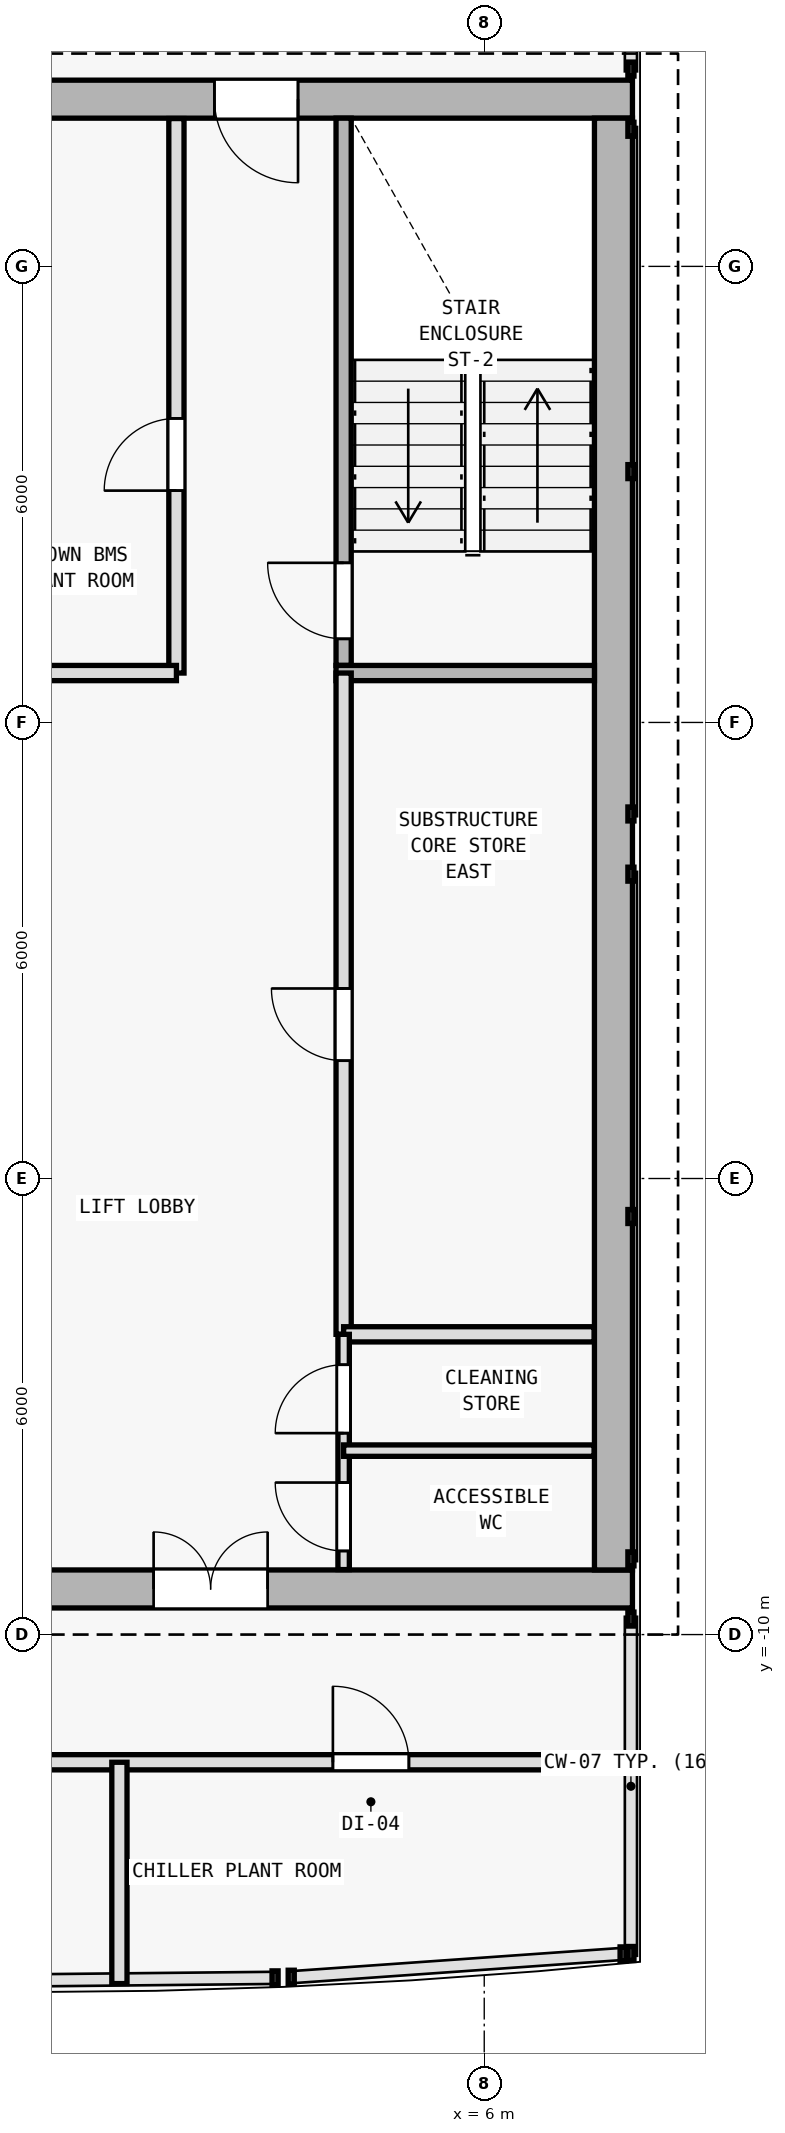
"""IFC4 building model, lengths in metres.
Left out: names, types, materials, properties, quantities, classifications, styles, units other than length and angle.
Written with IfcOpenShell. Run it as: python <this file> out.ifc"""

import sys

from ifc_helpers import new_model, si_unit, direction, frame, frame_2d, origin, origin_2d, place, context, subcontext, project, spatial, rectangle, i_section, extrude, element, fill, save


model = new_model("IFC4")
c1 = context("Model", 3, precision=1e-05, world=origin(), true_north=direction((0.0, 1.0)))
c2 = subcontext(c1, "Body", "Model", "MODEL_VIEW")
j1 = project(units=[si_unit("LENGTHUNIT", "METRE"), si_unit("PLANEANGLEUNIT", "RADIAN")], contexts=[c1])
p1 = place(None, origin())
s1 = spatial("IfcSite", under=j1, at=p1, CompositionType="ELEMENT")
p2 = place(p1, origin())
s2 = spatial("IfcBuilding", under=s1, at=p2, CompositionType="ELEMENT")
p3 = place(p2, frame((0.0, 0.0, 315.6)))
s3 = spatial("IfcBuildingStorey", under=s2, at=p3, CompositionType="ELEMENT", Elevation=315.6)
for number, where, z_axis, x_axis in (
    (1, (7.7, -9.4, 0.0), (0.0, 0.0, 1.0), (1.0, 0.0, 0.0)),
    (2, (7.7, 10.2, 0.0), (0.0, 0.0, 1.0), (1.0, 0.0, 0.0)),
    (3, (7.7, 0.4, 0.0), (0.0, 0.0, 1.0), (1.0, 0.0, 0.0)),
):
    element("IfcColumn", number, at=place(p3, frame(where, z_axis=z_axis, x_axis=x_axis)), inside=s3, PredefinedType="COLUMN", context=c2, shape_type="SweptSolid", body=[
        extrude(i_section(OverallWidth=0.374, OverallDepth=0.372, WebThickness=0.012, FlangeThickness=0.02, FilletRadius=0.015, at=origin_2d()), origin(), (0.0, 0.0, 1.0), 3.6),
    ])
p4 = place(p3, frame((-7.95, -9.4, 0.0), z_axis=(0.0, 0.0, 1.0), x_axis=(1.0, 0.0, 0.0)))
e4 = element("IfcWall", 4, at=p4, inside=s3, PredefinedType="SHEAR", context=c2, shape_type="SweptSolid", body=[
    extrude(rectangle(XDim=15.9, YDim=0.5, at=frame_2d((7.95, 0.0))), origin(), (0.0, 0.0, 1.0), 3.34),
])
p5 = place(p4, frame((9.6, 0.0, 0.0)))
e5 = element("IfcOpeningElement", 5, at=p5, cuts=e4, PredefinedType="OPENING", context=c2, shape_type="SweptSolid", body=[
    extrude(rectangle(XDim=1.5, YDim=2.2, at=frame_2d((0.75, 1.1))), frame((0.0, 0.26, 0.0), z_axis=(0.0, -1.0, 0.0), x_axis=(1.0, 0.0, 0.0)), (0.0, 0.0, 1.0), 0.52),
])
p6 = place(p3, frame((7.95, 10.2, 0.0), z_axis=(0.0, 0.0, 1.0), x_axis=(-1.0, 0.0, 0.0)))
e6 = element("IfcWall", 6, at=p6, inside=s3, PredefinedType="SHEAR", context=c2, shape_type="SweptSolid", body=[
    extrude(rectangle(XDim=15.9, YDim=0.5, at=frame_2d((7.95, 0.0))), origin(), (0.0, 0.0, 1.0), 3.34),
])
p7 = place(p6, frame((4.4, 0.0, 0.0)))
e7 = element("IfcOpeningElement", 7, at=p7, cuts=e6, PredefinedType="OPENING", context=c2, shape_type="SweptSolid", body=[
    extrude(rectangle(XDim=1.1, YDim=2.15, at=frame_2d((0.55, 1.075))), frame((0.0, 0.26, 0.0), z_axis=(0.0, -1.0, 0.0), x_axis=(1.0, 0.0, 0.0)), (0.0, 0.0, 1.0), 0.52),
])
p8 = place(p3, frame((7.7, 9.95, 0.0), z_axis=(0.0, 0.0, 1.0), x_axis=(0.0, -1.0, 0.0)))
e8 = element("IfcWall", 8, at=p8, inside=s3, PredefinedType="SHEAR", context=c2, shape_type="SweptSolid", body=[
    extrude(rectangle(XDim=19.1, YDim=0.5, at=frame_2d((9.55, 0.0))), origin(), (0.0, 0.0, 1.0), 3.34),
])
p9 = place(p3, frame((4.15, 2.75, 0.0), z_axis=(0.0, 0.0, 1.0), x_axis=(0.0, 1.0, 0.0)))
e9 = element("IfcWall", 9, at=p9, inside=s3, PredefinedType="SOLIDWALL", context=c2, shape_type="SweptSolid", body=[
    extrude(rectangle(XDim=7.2, YDim=0.2, at=frame_2d((3.6, 0.0))), origin(), (0.0, 0.0, 1.0), 3.34),
])
p10 = place(p9, frame((0.35, 0.0, 0.0)))
e10 = element("IfcOpeningElement", 10, at=p10, cuts=e9, PredefinedType="OPENING", context=c2, shape_type="SweptSolid", body=[
    extrude(rectangle(XDim=1.0, YDim=2.15, at=frame_2d((0.5, 1.075))), frame((0.0, 0.11, 0.0), z_axis=(0.0, -1.0, 0.0), x_axis=(1.0, 0.0, 0.0)), (0.0, 0.0, 1.0), 0.22),
])
p11 = place(p3, frame((4.05, 2.65, 0.0), z_axis=(0.0, 0.0, 1.0), x_axis=(1.0, 0.0, 0.0)))
e11 = element("IfcWall", 11, at=p11, inside=s3, PredefinedType="SOLIDWALL", context=c2, shape_type="SweptSolid", body=[
    extrude(rectangle(XDim=3.4, YDim=0.2, at=frame_2d((1.7, 0.0))), origin(), (0.0, 0.0, 1.0), 3.34),
])
p12 = place(p3, frame((4.15, -6.05, 0.0), z_axis=(0.0, 0.0, 1.0), x_axis=(0.0, 1.0, 0.0)))
e12 = element("IfcWall", 12, at=p12, inside=s3, PredefinedType="SOLIDWALL", context=c2, shape_type="SweptSolid", body=[
    extrude(rectangle(XDim=8.7, YDim=0.2, at=frame_2d((4.35, 0.0))), origin(), (0.0, 0.0, 1.0), 3.34),
])
p13 = place(p12, frame((3.6, 0.0, 0.0)))
e13 = element("IfcOpeningElement", 13, at=p13, cuts=e12, PredefinedType="OPENING", context=c2, shape_type="SweptSolid", body=[
    extrude(rectangle(XDim=0.95, YDim=2.1, at=frame_2d((0.475, 1.05))), frame((0.0, 0.11, 0.0), z_axis=(0.0, -1.0, 0.0), x_axis=(1.0, 0.0, 0.0)), (0.0, 0.0, 1.0), 0.22),
])
p14 = place(p3, frame((1.95, 2.65, 0.0), z_axis=(0.0, 0.0, 1.0), x_axis=(0.0, 1.0, 0.0)))
e14 = element("IfcWall", 14, at=p14, inside=s3, PredefinedType="SOLIDWALL", context=c2, shape_type="SweptSolid", body=[
    extrude(rectangle(XDim=7.295, YDim=0.2, at=frame_2d((3.647, 0.0))), origin(), (0.0, 0.0, 1.0), 3.34),
])
p15 = place(p14, frame((2.4, 0.0, 0.0)))
e15 = element("IfcOpeningElement", 15, at=p15, cuts=e14, PredefinedType="OPENING", context=c2, shape_type="SweptSolid", body=[
    extrude(rectangle(XDim=0.95, YDim=2.1, at=frame_2d((0.475, 1.05))), frame((0.0, 0.11, 0.0), z_axis=(0.0, -1.0, 0.0), x_axis=(1.0, 0.0, 0.0)), (0.0, 0.0, 1.0), 0.22),
])
p16 = place(p3, frame((-0.95, 2.65, 0.0), z_axis=(0.0, 0.0, 1.0), x_axis=(1.0, 0.0, 0.0)))
e16 = element("IfcWall", 16, at=p16, inside=s3, PredefinedType="SOLIDWALL", context=c2, shape_type="SweptSolid", body=[
    extrude(rectangle(XDim=2.9, YDim=0.2, at=frame_2d((1.45, 0.0))), origin(), (0.0, 0.0, 1.0), 3.34),
])
p17 = place(p3, frame((4.15, -6.05, 0.0), z_axis=(0.0, 0.0, 1.0), x_axis=(1.0, 0.0, 0.0)))
e17 = element("IfcWall", 17, at=p17, inside=s3, PredefinedType="SOLIDWALL", context=c2, shape_type="SweptSolid", body=[
    extrude(rectangle(XDim=3.295, YDim=0.2, at=frame_2d((1.647, 0.0))), origin(), (0.0, 0.0, 1.0), 3.34),
])
p18 = place(p3, frame((4.15, -9.145, 0.0), z_axis=(0.0, 0.0, 1.0), x_axis=(0.0, 1.0, 0.0)))
e18 = element("IfcWall", 18, at=p18, inside=s3, PredefinedType="PARTITIONING", context=c2, shape_type="SweptSolid", body=[
    extrude(rectangle(XDim=3.095, YDim=0.15, at=frame_2d((1.547, 0.0))), origin(), (0.0, 0.0, 1.0), 3.34),
])
p19 = place(p18, frame((0.245, 0.0, 0.0)))
e19 = element("IfcOpeningElement", 19, at=p19, cuts=e18, PredefinedType="OPENING", context=c2, shape_type="SweptSolid", body=[
    extrude(rectangle(XDim=0.9, YDim=2.1, at=frame_2d((0.45, 1.05))), frame((0.0, 0.085, 0.0), z_axis=(0.0, -1.0, 0.0), x_axis=(1.0, 0.0, 0.0)), (0.0, 0.0, 1.0), 0.17),
])
p20 = place(p18, frame((1.795, 0.0, 0.0)))
e20 = element("IfcOpeningElement", 20, at=p20, cuts=e18, PredefinedType="OPENING", context=c2, shape_type="SweptSolid", body=[
    extrude(rectangle(XDim=0.9, YDim=2.1, at=frame_2d((0.45, 1.05))), frame((0.0, 0.085, 0.0), z_axis=(0.0, -1.0, 0.0), x_axis=(1.0, 0.0, 0.0)), (0.0, 0.0, 1.0), 0.17),
])
p21 = place(p3, frame((4.15, -7.58, 0.0), z_axis=(0.0, 0.0, 1.0), x_axis=(1.0, 0.0, 0.0)))
e21 = element("IfcWall", 21, at=p21, inside=s3, PredefinedType="PARTITIONING", context=c2, shape_type="SweptSolid", body=[
    extrude(rectangle(XDim=3.295, YDim=0.15, at=frame_2d((1.647, 0.0))), origin(), (0.0, 0.0, 1.0), 3.34),
])
p22 = place(p3, frame((-10.18, -11.68, 0.0), z_axis=(0.0, 0.0, 1.0), x_axis=(1.0, 0.0, 0.0)))
e22 = element("IfcWall", 22, at=p22, inside=s3, PredefinedType="SOLIDWALL", context=c2, shape_type="SweptSolid", body=[
    extrude(rectangle(XDim=18.13, YDim=0.2, at=frame_2d((9.065, 0.0))), origin(), (0.0, 0.0, 1.0), 2.995),
])
p23 = place(p22, frame((5.436, 0.0, 0.0)))
e23 = element("IfcOpeningElement", 23, at=p23, cuts=e22, PredefinedType="OPENING", context=c2, shape_type="SweptSolid", body=[
    extrude(rectangle(XDim=1.0, YDim=2.15, at=frame_2d((0.5, 1.075))), frame((0.0, 0.11, 0.0), z_axis=(0.0, -1.0, 0.0), x_axis=(1.0, 0.0, 0.0)), (0.0, 0.0, 1.0), 0.22),
])
p24 = place(p22, frame((14.189, 0.0, 0.0)))
e24 = element("IfcOpeningElement", 24, at=p24, cuts=e22, PredefinedType="OPENING", context=c2, shape_type="SweptSolid", body=[
    extrude(rectangle(XDim=1.0, YDim=2.15, at=frame_2d((0.5, 1.075))), frame((0.0, 0.11, 0.0), z_axis=(0.0, -1.0, 0.0), x_axis=(1.0, 0.0, 0.0)), (0.0, 0.0, 1.0), 0.22),
])
p25 = place(p3, frame((1.2, -14.592, 0.0), z_axis=(0.0, 0.0, 1.0), x_axis=(0.0, 1.0, 0.0)))
e25 = element("IfcWall", 25, at=p25, inside=s3, PredefinedType="SOLIDWALL", context=c2, shape_type="SweptSolid", body=[
    extrude(rectangle(XDim=2.912, YDim=0.2, at=frame_2d((1.456, 0.0))), origin(), (0.0, 0.0, 1.0), 3.34),
])
p26 = place(p5, origin())
e26 = element("IfcDoor", 26, at=p26, inside=s3, OperationType="DOUBLE_DOOR_SINGLE_SWING", PredefinedType="DOOR", context=c2, shape_type="SweptSolid", body=[
    extrude(rectangle(XDim=1.5, YDim=2.2, at=frame_2d((0.75, 1.1))), frame((0.0, 0.025, 0.0), z_axis=(0.0, -1.0, 0.0), x_axis=(1.0, 0.0, 0.0)), (0.0, 0.0, 1.0), 0.05),
])
fill(e5, e26)
p27 = place(p7, origin())
e27 = element("IfcDoor", 27, at=p27, inside=s3, OperationType="SINGLE_SWING_LEFT", PredefinedType="DOOR", context=c2, shape_type="SweptSolid", body=[
    extrude(rectangle(XDim=1.1, YDim=2.15, at=frame_2d((0.55, 1.075))), frame((0.0, 0.025, 0.0), z_axis=(0.0, -1.0, 0.0), x_axis=(1.0, 0.0, 0.0)), (0.0, 0.0, 1.0), 0.05),
])
fill(e7, e27)
p28 = place(p10, origin())
e28 = element("IfcDoor", 28, at=p28, inside=s3, OperationType="SINGLE_SWING_RIGHT", PredefinedType="DOOR", context=c2, shape_type="SweptSolid", body=[
    extrude(rectangle(XDim=1.0, YDim=2.15, at=frame_2d((0.5, 1.075))), frame((0.0, 0.025, 0.0), z_axis=(0.0, -1.0, 0.0), x_axis=(1.0, 0.0, 0.0)), (0.0, 0.0, 1.0), 0.05),
])
fill(e10, e28)
p29 = place(p13, origin())
e29 = element("IfcDoor", 29, at=p29, inside=s3, OperationType="SINGLE_SWING_RIGHT", PredefinedType="DOOR", context=c2, shape_type="SweptSolid", body=[
    extrude(rectangle(XDim=0.95, YDim=2.1, at=frame_2d((0.475, 1.05))), frame((0.0, 0.025, 0.0), z_axis=(0.0, -1.0, 0.0), x_axis=(1.0, 0.0, 0.0)), (0.0, 0.0, 1.0), 0.05),
])
fill(e13, e29)
p30 = place(p15, origin())
e30 = element("IfcDoor", 30, at=p30, inside=s3, OperationType="SINGLE_SWING_LEFT", PredefinedType="DOOR", context=c2, shape_type="SweptSolid", body=[
    extrude(rectangle(XDim=0.95, YDim=2.1, at=frame_2d((0.475, 1.05))), frame((0.0, 0.025, 0.0), z_axis=(0.0, -1.0, 0.0), x_axis=(1.0, 0.0, 0.0)), (0.0, 0.0, 1.0), 0.05),
])
fill(e15, e30)
p31 = place(p19, origin())
e31 = element("IfcDoor", 31, at=p31, inside=s3, OperationType="SINGLE_SWING_RIGHT", PredefinedType="DOOR", context=c2, shape_type="SweptSolid", body=[
    extrude(rectangle(XDim=0.9, YDim=2.1, at=frame_2d((0.45, 1.05))), frame((0.0, 0.025, 0.0), z_axis=(0.0, -1.0, 0.0), x_axis=(1.0, 0.0, 0.0)), (0.0, 0.0, 1.0), 0.05),
])
fill(e19, e31)
p32 = place(p20, origin())
e32 = element("IfcDoor", 32, at=p32, inside=s3, OperationType="SINGLE_SWING_LEFT", PredefinedType="DOOR", context=c2, shape_type="SweptSolid", body=[
    extrude(rectangle(XDim=0.9, YDim=2.1, at=frame_2d((0.45, 1.05))), frame((0.0, 0.025, 0.0), z_axis=(0.0, -1.0, 0.0), x_axis=(1.0, 0.0, 0.0)), (0.0, 0.0, 1.0), 0.05),
])
fill(e20, e32)
p33 = place(p24, origin())
e33 = element("IfcDoor", 33, at=p33, inside=s3, OperationType="SINGLE_SWING_LEFT", PredefinedType="DOOR", context=c2, shape_type="SweptSolid", body=[
    extrude(rectangle(XDim=1.0, YDim=2.15, at=frame_2d((0.5, 1.075))), frame((0.0, 0.025, 0.0), z_axis=(0.0, -1.0, 0.0), x_axis=(1.0, 0.0, 0.0)), (0.0, 0.0, 1.0), 0.05),
])
fill(e24, e33)
save(model, sys.argv[1])
